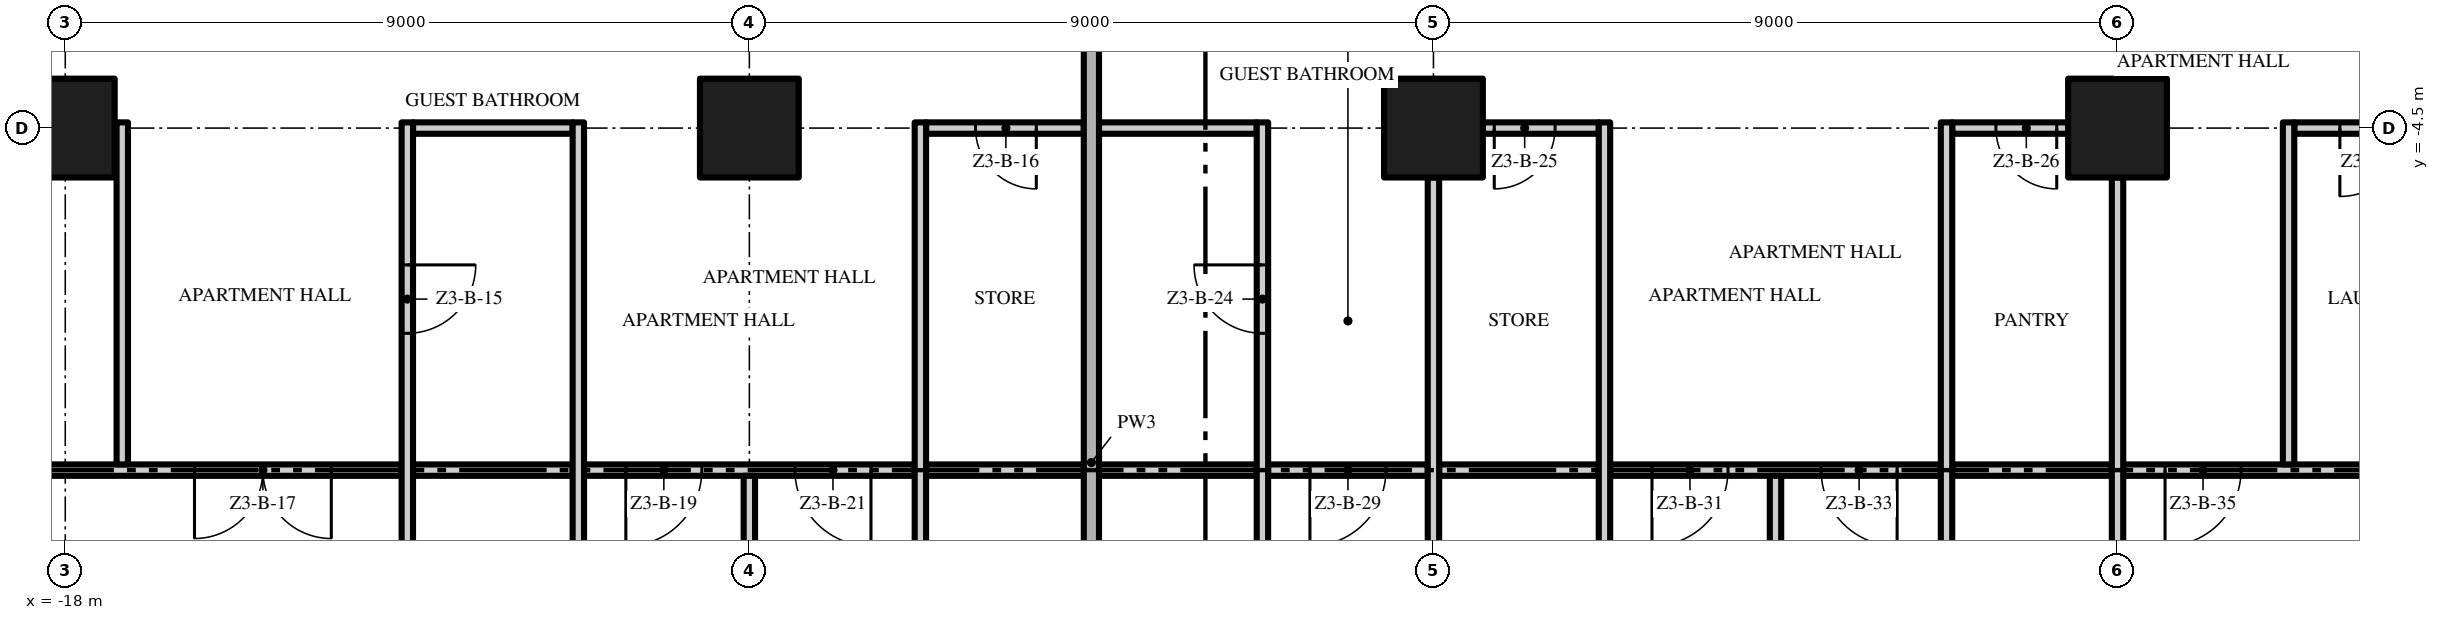
"""IFC4 building model, lengths in metres.
Left out: names, types, materials, properties, quantities, classifications, styles, units other than length and angle.
Written with IfcOpenShell. Run it as: python <this file> out.ifc"""

import sys

from ifc_helpers import new_model, si_unit, direction, frame, frame_2d, origin, origin_2d, place, context, subcontext, project, spatial, rectangle, extrude, element, fill, save


model = new_model("IFC4")
c1 = context("Model", 3, precision=1e-05, world=origin(), true_north=direction((0.0, 1.0)))
c2 = subcontext(c1, "Body", "Model", "MODEL_VIEW")
j1 = project(units=[si_unit("LENGTHUNIT", "METRE"), si_unit("PLANEANGLEUNIT", "RADIAN")], contexts=[c1])
p1 = place(None, origin())
s1 = spatial("IfcSite", under=j1, at=p1, CompositionType="ELEMENT")
p2 = place(p1, origin())
s2 = spatial("IfcBuilding", under=s1, at=p2, CompositionType="ELEMENT")
p3 = place(p2, frame((0.0, 0.0, 136.4)))
s3 = spatial("IfcBuildingStorey", under=s2, at=p3, CompositionType="ELEMENT", Elevation=136.4)
for number, where, z_axis, x_axis in (
    (1, (-18.0, -4.5, 0.0), (0.0, 0.0, 1.0), (1.0, 0.0, 0.0)),
    (2, (-9.0, -4.5, 0.0), (0.0, 0.0, 1.0), (1.0, 0.0, 0.0)),
    (3, (0.0, -4.5, 0.0), (0.0, 0.0, 1.0), (1.0, 0.0, 0.0)),
    (4, (9.0, -4.5, 0.0), (0.0, 0.0, 1.0), (1.0, 0.0, 0.0)),
):
    element("IfcColumn", number, at=place(p3, frame(where, z_axis=z_axis, x_axis=x_axis)), inside=s3, PredefinedType="COLUMN", context=c2, shape_type="SweptSolid", body=[
        extrude(rectangle(XDim=1.3, YDim=1.3, at=origin_2d()), origin(), (0.0, 0.0, 1.0), 3.5),
    ])
p4 = place(p3, frame((-13.575, -9.0, 0.0), z_axis=(0.0, 0.0, 1.0), x_axis=(-1.0, 0.0, 0.0)))
e5 = element("IfcWall", 5, at=p4, inside=s3, PredefinedType="PARTITIONING", context=c2, shape_type="SweptSolid", body=[
    extrude(rectangle(XDim=8.625, YDim=0.15, at=frame_2d((4.312, 0.0))), origin(), (0.0, 0.0, 1.0), 3.5),
])
p5 = place(p4, frame((0.925, 0.0, 0.0)))
e6 = element("IfcOpeningElement", 6, at=p5, cuts=e5, PredefinedType="OPENING", context=c2, shape_type="SweptSolid", body=[
    extrude(rectangle(XDim=1.8, YDim=2.4, at=frame_2d((0.9, 1.2))), frame((0.0, 0.085, 0.0), z_axis=(0.0, -1.0, 0.0), x_axis=(1.0, 0.0, 0.0)), (0.0, 0.0, 1.0), 0.17),
])
p6 = place(p3, frame((-13.425, -9.0, 0.0), z_axis=(0.0, 0.0, 1.0), x_axis=(1.0, 0.0, 0.0)))
e7 = element("IfcWall", 7, at=p6, inside=s3, PredefinedType="PARTITIONING", context=c2, shape_type="SweptSolid", body=[
    extrude(rectangle(XDim=2.1, YDim=0.15, at=frame_2d((1.05, 0.0))), origin(), (0.0, 0.0, 1.0), 3.5),
])
p7 = place(p3, frame((-6.825, -9.0, 0.0), z_axis=(0.0, 0.0, 1.0), x_axis=(-1.0, 0.0, 0.0)))
e8 = element("IfcWall", 8, at=p7, inside=s3, PredefinedType="PARTITIONING", context=c2, shape_type="SweptSolid", body=[
    extrude(rectangle(XDim=4.35, YDim=0.15, at=frame_2d((2.175, 0.0))), origin(), (0.0, 0.0, 1.0), 3.5),
])
p8 = place(p7, frame((2.8, 0.0, 0.0)))
e9 = element("IfcOpeningElement", 9, at=p8, cuts=e8, PredefinedType="OPENING", context=c2, shape_type="SweptSolid", body=[
    extrude(rectangle(XDim=1.0, YDim=2.4, at=frame_2d((0.5, 1.2))), frame((0.0, 0.085, 0.0), z_axis=(0.0, -1.0, 0.0), x_axis=(1.0, 0.0, 0.0)), (0.0, 0.0, 1.0), 0.17),
])
p9 = place(p7, frame((0.575, 0.0, 0.0)))
e10 = element("IfcOpeningElement", 10, at=p9, cuts=e8, PredefinedType="OPENING", context=c2, shape_type="SweptSolid", body=[
    extrude(rectangle(XDim=1.0, YDim=2.4, at=frame_2d((0.5, 1.2))), frame((0.0, 0.085, 0.0), z_axis=(0.0, -1.0, 0.0), x_axis=(1.0, 0.0, 0.0)), (0.0, 0.0, 1.0), 0.17),
])
for number, where, z_axis, x_axis in (
    (11, (-6.675, -9.0, 0.0), (0.0, 0.0, 1.0), (1.0, 0.0, 0.0)),
    (12, (-4.4, -9.0, 0.0), (0.0, 0.0, 1.0), (1.0, 0.0, 0.0)),
):
    element("IfcWall", number, at=place(p3, frame(where, z_axis=z_axis, x_axis=x_axis)), inside=s3, PredefinedType="PARTITIONING", context=c2, shape_type="SweptSolid", body=[
        extrude(rectangle(XDim=2.075, YDim=0.15, at=frame_2d((1.038, 0.0))), origin(), (0.0, 0.0, 1.0), 3.5),
    ])
p10 = place(p3, frame((-0.075, -9.0, 0.0), z_axis=(0.0, 0.0, 1.0), x_axis=(-1.0, 0.0, 0.0)))
e13 = element("IfcWall", 13, at=p10, inside=s3, PredefinedType="PARTITIONING", context=c2, shape_type="SweptSolid", body=[
    extrude(rectangle(XDim=2.1, YDim=0.15, at=frame_2d((1.05, 0.0))), origin(), (0.0, 0.0, 1.0), 3.5),
])
p11 = place(p10, frame((0.55, 0.0, 0.0)))
e14 = element("IfcOpeningElement", 14, at=p11, cuts=e13, PredefinedType="OPENING", context=c2, shape_type="SweptSolid", body=[
    extrude(rectangle(XDim=1.0, YDim=2.4, at=frame_2d((0.5, 1.2))), frame((0.0, 0.085, 0.0), z_axis=(0.0, -1.0, 0.0), x_axis=(1.0, 0.0, 0.0)), (0.0, 0.0, 1.0), 0.17),
])
p12 = place(p3, frame((0.075, -9.0, 0.0), z_axis=(0.0, 0.0, 1.0), x_axis=(1.0, 0.0, 0.0)))
e15 = element("IfcWall", 15, at=p12, inside=s3, PredefinedType="PARTITIONING", context=c2, shape_type="SweptSolid", body=[
    extrude(rectangle(XDim=2.1, YDim=0.15, at=frame_2d((1.05, 0.0))), origin(), (0.0, 0.0, 1.0), 3.5),
])
p13 = place(p3, frame((6.675, -9.0, 0.0), z_axis=(0.0, 0.0, 1.0), x_axis=(-1.0, 0.0, 0.0)))
e16 = element("IfcWall", 16, at=p13, inside=s3, PredefinedType="PARTITIONING", context=c2, shape_type="SweptSolid", body=[
    extrude(rectangle(XDim=4.35, YDim=0.15, at=frame_2d((2.175, 0.0))), origin(), (0.0, 0.0, 1.0), 3.5),
])
p14 = place(p13, frame((2.8, 0.0, 0.0)))
e17 = element("IfcOpeningElement", 17, at=p14, cuts=e16, PredefinedType="OPENING", context=c2, shape_type="SweptSolid", body=[
    extrude(rectangle(XDim=1.0, YDim=2.4, at=frame_2d((0.5, 1.2))), frame((0.0, 0.085, 0.0), z_axis=(0.0, -1.0, 0.0), x_axis=(1.0, 0.0, 0.0)), (0.0, 0.0, 1.0), 0.17),
])
p15 = place(p13, frame((0.575, 0.0, 0.0)))
e18 = element("IfcOpeningElement", 18, at=p15, cuts=e16, PredefinedType="OPENING", context=c2, shape_type="SweptSolid", body=[
    extrude(rectangle(XDim=1.0, YDim=2.4, at=frame_2d((0.5, 1.2))), frame((0.0, 0.085, 0.0), z_axis=(0.0, -1.0, 0.0), x_axis=(1.0, 0.0, 0.0)), (0.0, 0.0, 1.0), 0.17),
])
p16 = place(p3, frame((6.825, -9.0, 0.0), z_axis=(0.0, 0.0, 1.0), x_axis=(1.0, 0.0, 0.0)))
e19 = element("IfcWall", 19, at=p16, inside=s3, PredefinedType="PARTITIONING", context=c2, shape_type="SweptSolid", body=[
    extrude(rectangle(XDim=2.1, YDim=0.15, at=frame_2d((1.05, 0.0))), origin(), (0.0, 0.0, 1.0), 3.5),
])
p17 = place(p3, frame((13.425, -9.0, 0.0), z_axis=(0.0, 0.0, 1.0), x_axis=(-1.0, 0.0, 0.0)))
e20 = element("IfcWall", 20, at=p17, inside=s3, PredefinedType="PARTITIONING", context=c2, shape_type="SweptSolid", body=[
    extrude(rectangle(XDim=4.35, YDim=0.15, at=frame_2d((2.175, 0.0))), origin(), (0.0, 0.0, 1.0), 3.5),
])
p18 = place(p17, frame((2.8, 0.0, 0.0)))
e21 = element("IfcOpeningElement", 21, at=p18, cuts=e20, PredefinedType="OPENING", context=c2, shape_type="SweptSolid", body=[
    extrude(rectangle(XDim=1.0, YDim=2.4, at=frame_2d((0.5, 1.2))), frame((0.0, 0.085, 0.0), z_axis=(0.0, -1.0, 0.0), x_axis=(1.0, 0.0, 0.0)), (0.0, 0.0, 1.0), 0.17),
])
p19 = place(p3, frame((-13.425, -4.5, 0.0), z_axis=(0.0, 0.0, 1.0), x_axis=(1.0, 0.0, 0.0)))
e22 = element("IfcWall", 22, at=p19, inside=s3, PredefinedType="PARTITIONING", context=c2, shape_type="SweptSolid", body=[
    extrude(rectangle(XDim=2.1, YDim=0.15, at=frame_2d((1.05, 0.0))), origin(), (0.0, 0.0, 1.0), 3.5),
])
p20 = place(p3, frame((-4.6, -4.5, 0.0), z_axis=(0.0, 0.0, 1.0), x_axis=(-1.0, 0.0, 0.0)))
e23 = element("IfcWall", 23, at=p20, inside=s3, PredefinedType="PARTITIONING", context=c2, shape_type="SweptSolid", body=[
    extrude(rectangle(XDim=2.075, YDim=0.15, at=frame_2d((1.038, 0.0))), origin(), (0.0, 0.0, 1.0), 3.5),
])
p21 = place(p20, frame((0.625, 0.0, 0.0)))
e24 = element("IfcOpeningElement", 24, at=p21, cuts=e23, PredefinedType="OPENING", context=c2, shape_type="SweptSolid", body=[
    extrude(rectangle(XDim=0.8, YDim=2.0, at=frame_2d((0.4, 1.0))), frame((0.0, 0.085, 0.0), z_axis=(0.0, -1.0, 0.0), x_axis=(1.0, 0.0, 0.0)), (0.0, 0.0, 1.0), 0.17),
])
p22 = place(p3, frame((-4.4, -4.5, 0.0), z_axis=(0.0, 0.0, 1.0), x_axis=(1.0, 0.0, 0.0)))
e25 = element("IfcWall", 25, at=p22, inside=s3, PredefinedType="PARTITIONING", context=c2, shape_type="SweptSolid", body=[
    extrude(rectangle(XDim=2.075, YDim=0.15, at=frame_2d((1.038, 0.0))), origin(), (0.0, 0.0, 1.0), 3.5),
])
p23 = place(p3, frame((2.175, -4.5, 0.0), z_axis=(0.0, 0.0, 1.0), x_axis=(-1.0, 0.0, 0.0)))
e26 = element("IfcWall", 26, at=p23, inside=s3, PredefinedType="PARTITIONING", context=c2, shape_type="SweptSolid", body=[
    extrude(rectangle(XDim=1.525, YDim=0.15, at=frame_2d((0.762, 0.0))), origin(), (0.0, 0.0, 1.0), 3.5),
])
p24 = place(p23, frame((0.575, 0.0, 0.0)))
e27 = element("IfcOpeningElement", 27, at=p24, cuts=e26, PredefinedType="OPENING", context=c2, shape_type="SweptSolid", body=[
    extrude(rectangle(XDim=0.8, YDim=2.0, at=frame_2d((0.4, 1.0))), frame((0.0, 0.085, 0.0), z_axis=(0.0, -1.0, 0.0), x_axis=(1.0, 0.0, 0.0)), (0.0, 0.0, 1.0), 0.17),
])
p25 = place(p3, frame((8.35, -4.5, 0.0), z_axis=(0.0, 0.0, 1.0), x_axis=(-1.0, 0.0, 0.0)))
e28 = element("IfcWall", 28, at=p25, inside=s3, PredefinedType="PARTITIONING", context=c2, shape_type="SweptSolid", body=[
    extrude(rectangle(XDim=1.525, YDim=0.15, at=frame_2d((0.762, 0.0))), origin(), (0.0, 0.0, 1.0), 3.5),
])
p26 = place(p25, frame((0.15, 0.0, 0.0)))
e29 = element("IfcOpeningElement", 29, at=p26, cuts=e28, PredefinedType="OPENING", context=c2, shape_type="SweptSolid", body=[
    extrude(rectangle(XDim=0.8, YDim=2.0, at=frame_2d((0.4, 1.0))), frame((0.0, 0.085, 0.0), z_axis=(0.0, -1.0, 0.0), x_axis=(1.0, 0.0, 0.0)), (0.0, 0.0, 1.0), 0.17),
])
p27 = place(p3, frame((13.425, -4.5, 0.0), z_axis=(0.0, 0.0, 1.0), x_axis=(-1.0, 0.0, 0.0)))
e30 = element("IfcWall", 30, at=p27, inside=s3, PredefinedType="PARTITIONING", context=c2, shape_type="SweptSolid", body=[
    extrude(rectangle(XDim=2.1, YDim=0.15, at=frame_2d((1.05, 0.0))), origin(), (0.0, 0.0, 1.0), 3.5),
])
p28 = place(p27, frame((0.6, 0.0, 0.0)))
e31 = element("IfcOpeningElement", 31, at=p28, cuts=e30, PredefinedType="OPENING", context=c2, shape_type="SweptSolid", body=[
    extrude(rectangle(XDim=0.9, YDim=2.1, at=frame_2d((0.45, 1.05))), frame((0.0, 0.085, 0.0), z_axis=(0.0, -1.0, 0.0), x_axis=(1.0, 0.0, 0.0)), (0.0, 0.0, 1.0), 0.17),
])
p29 = place(p3, frame((-17.25, -8.925, 0.0), z_axis=(0.0, 0.0, 1.0), x_axis=(0.0, 1.0, 0.0)))
e32 = element("IfcWall", 32, at=p29, inside=s3, PredefinedType="PARTITIONING", context=c2, shape_type="SweptSolid", body=[
    extrude(rectangle(XDim=4.5, YDim=0.15, at=frame_2d((2.25, 0.0))), origin(), (0.0, 0.0, 1.0), 3.5),
])
p30 = place(p3, frame((-13.5, -4.425, 0.0), z_axis=(0.0, 0.0, 1.0), x_axis=(0.0, -1.0, 0.0)))
e33 = element("IfcWall", 33, at=p30, inside=s3, PredefinedType="PARTITIONING", context=c2, shape_type="SweptSolid", body=[
    extrude(rectangle(XDim=13.275, YDim=0.15, at=frame_2d((6.638, 0.0))), origin(), (0.0, 0.0, 1.0), 3.5),
])
p31 = place(p30, frame((1.875, 0.0, 0.0)))
e34 = element("IfcOpeningElement", 34, at=p31, cuts=e33, PredefinedType="OPENING", context=c2, shape_type="SweptSolid", body=[
    extrude(rectangle(XDim=0.9, YDim=2.1, at=frame_2d((0.45, 1.05))), frame((0.0, 0.085, 0.0), z_axis=(0.0, -1.0, 0.0), x_axis=(1.0, 0.0, 0.0)), (0.0, 0.0, 1.0), 0.17),
])
p32 = place(p3, frame((-11.25, -12.075, 0.0), z_axis=(0.0, 0.0, 1.0), x_axis=(0.0, 1.0, 0.0)))
e35 = element("IfcWall", 35, at=p32, inside=s3, PredefinedType="PARTITIONING", context=c2, shape_type="SweptSolid", body=[
    extrude(rectangle(XDim=7.65, YDim=0.15, at=frame_2d((3.825, 0.0))), origin(), (0.0, 0.0, 1.0), 3.5),
])
p33 = place(p3, frame((-9.0, -12.85, 0.0), z_axis=(0.0, 0.0, 1.0), x_axis=(0.0, 1.0, 0.0)))
e36 = element("IfcWall", 36, at=p33, inside=s3, PredefinedType="PARTITIONING", context=c2, shape_type="SweptSolid", body=[
    extrude(rectangle(XDim=3.775, YDim=0.15, at=frame_2d((1.887, 0.0))), origin(), (0.0, 0.0, 1.0), 3.5),
])
p34 = place(p3, frame((-6.75, -12.075, 0.0), z_axis=(0.0, 0.0, 1.0), x_axis=(0.0, 1.0, 0.0)))
e37 = element("IfcWall", 37, at=p34, inside=s3, PredefinedType="PARTITIONING", context=c2, shape_type="SweptSolid", body=[
    extrude(rectangle(XDim=7.65, YDim=0.15, at=frame_2d((3.825, 0.0))), origin(), (0.0, 0.0, 1.0), 3.5),
])
p35 = place(p3, frame((-4.5, -17.7, 0.0), z_axis=(0.0, 0.0, 1.0), x_axis=(0.0, 1.0, 0.0)))
e38 = element("IfcWall", 38, at=p35, inside=s3, PredefinedType="PARTITIONING", context=c2, shape_type="SweptSolid", body=[
    extrude(rectangle(XDim=17.6, YDim=0.2, at=frame_2d((8.8, 0.0))), origin(), (0.0, 0.0, 1.0), 3.5),
])
p36 = place(p3, frame((-2.25, -12.075, 0.0), z_axis=(0.0, 0.0, 1.0), x_axis=(0.0, 1.0, 0.0)))
e39 = element("IfcWall", 39, at=p36, inside=s3, PredefinedType="PARTITIONING", context=c2, shape_type="SweptSolid", body=[
    extrude(rectangle(XDim=7.65, YDim=0.15, at=frame_2d((3.825, 0.0))), origin(), (0.0, 0.0, 1.0), 3.5),
])
p37 = place(p36, frame((4.875, 0.0, 0.0)))
e40 = element("IfcOpeningElement", 40, at=p37, cuts=e39, PredefinedType="OPENING", context=c2, shape_type="SweptSolid", body=[
    extrude(rectangle(XDim=0.9, YDim=2.1, at=frame_2d((0.45, 1.05))), frame((0.0, 0.085, 0.0), z_axis=(0.0, -1.0, 0.0), x_axis=(1.0, 0.0, 0.0)), (0.0, 0.0, 1.0), 0.17),
])
p38 = place(p36, frame((1.125, 0.0, 0.0)))
e41 = element("IfcOpeningElement", 41, at=p38, cuts=e39, PredefinedType="OPENING", context=c2, shape_type="SweptSolid", body=[
    extrude(rectangle(XDim=0.9, YDim=2.1, at=frame_2d((0.45, 1.05))), frame((0.0, 0.085, 0.0), z_axis=(0.0, -1.0, 0.0), x_axis=(1.0, 0.0, 0.0)), (0.0, 0.0, 1.0), 0.17),
])
p39 = place(p3, frame((0.0, -12.85, 0.0), z_axis=(0.0, 0.0, 1.0), x_axis=(0.0, 1.0, 0.0)))
e42 = element("IfcWall", 42, at=p39, inside=s3, PredefinedType="PARTITIONING", context=c2, shape_type="SweptSolid", body=[
    extrude(rectangle(XDim=7.7, YDim=0.15, at=frame_2d((3.85, 0.0))), origin(), (0.0, 0.0, 1.0), 3.5),
])
p40 = place(p3, frame((2.25, -12.075, 0.0), z_axis=(0.0, 0.0, 1.0), x_axis=(0.0, 1.0, 0.0)))
e43 = element("IfcWall", 43, at=p40, inside=s3, PredefinedType="PARTITIONING", context=c2, shape_type="SweptSolid", body=[
    extrude(rectangle(XDim=7.65, YDim=0.15, at=frame_2d((3.825, 0.0))), origin(), (0.0, 0.0, 1.0), 3.5),
])
p41 = place(p3, frame((4.5, -17.7, 0.0), z_axis=(0.0, 0.0, 1.0), x_axis=(0.0, 1.0, 0.0)))
e44 = element("IfcWall", 44, at=p41, inside=s3, PredefinedType="PARTITIONING", context=c2, shape_type="SweptSolid", body=[
    extrude(rectangle(XDim=8.625, YDim=0.15, at=frame_2d((4.312, 0.0))), origin(), (0.0, 0.0, 1.0), 3.5),
])
p42 = place(p3, frame((6.75, -12.075, 0.0), z_axis=(0.0, 0.0, 1.0), x_axis=(0.0, 1.0, 0.0)))
e45 = element("IfcWall", 45, at=p42, inside=s3, PredefinedType="PARTITIONING", context=c2, shape_type="SweptSolid", body=[
    extrude(rectangle(XDim=7.65, YDim=0.15, at=frame_2d((3.825, 0.0))), origin(), (0.0, 0.0, 1.0), 3.5),
])
p43 = place(p3, frame((9.0, -12.85, 0.0), z_axis=(0.0, 0.0, 1.0), x_axis=(0.0, 1.0, 0.0)))
e46 = element("IfcWall", 46, at=p43, inside=s3, PredefinedType="PARTITIONING", context=c2, shape_type="SweptSolid", body=[
    extrude(rectangle(XDim=7.7, YDim=0.15, at=frame_2d((3.85, 0.0))), origin(), (0.0, 0.0, 1.0), 3.5),
])
p44 = place(p3, frame((11.25, -8.925, 0.0), z_axis=(0.0, 0.0, 1.0), x_axis=(0.0, 1.0, 0.0)))
e47 = element("IfcWall", 47, at=p44, inside=s3, PredefinedType="PARTITIONING", context=c2, shape_type="SweptSolid", body=[
    extrude(rectangle(XDim=4.5, YDim=0.15, at=frame_2d((2.25, 0.0))), origin(), (0.0, 0.0, 1.0), 3.5),
])
p45 = place(p31, origin())
e48 = element("IfcDoor", 48, at=p45, inside=s3, OperationType="SINGLE_SWING_LEFT", PredefinedType="DOOR", context=c2, shape_type="SweptSolid", body=[
    extrude(rectangle(XDim=0.9, YDim=2.1, at=frame_2d((0.45, 1.05))), frame((0.0, 0.025, 0.0), z_axis=(0.0, -1.0, 0.0), x_axis=(1.0, 0.0, 0.0)), (0.0, 0.0, 1.0), 0.05),
])
fill(e34, e48)
p46 = place(p21, origin())
e49 = element("IfcDoor", 49, at=p46, inside=s3, OperationType="SINGLE_SWING_LEFT", PredefinedType="DOOR", context=c2, shape_type="SweptSolid", body=[
    extrude(rectangle(XDim=0.8, YDim=2.0, at=frame_2d((0.4, 1.0))), frame((0.0, 0.025, 0.0), z_axis=(0.0, -1.0, 0.0), x_axis=(1.0, 0.0, 0.0)), (0.0, 0.0, 1.0), 0.05),
])
fill(e24, e49)
p47 = place(p5, origin())
e50 = element("IfcDoor", 50, at=p47, inside=s3, OperationType="DOUBLE_DOOR_SINGLE_SWING", PredefinedType="DOOR", context=c2, shape_type="SweptSolid", body=[
    extrude(rectangle(XDim=1.8, YDim=2.4, at=frame_2d((0.9, 1.2))), frame((0.0, 0.025, 0.0), z_axis=(0.0, -1.0, 0.0), x_axis=(1.0, 0.0, 0.0)), (0.0, 0.0, 1.0), 0.05),
])
fill(e6, e50)
p48 = place(p8, origin())
e51 = element("IfcDoor", 51, at=p48, inside=s3, OperationType="SINGLE_SWING_RIGHT", PredefinedType="DOOR", context=c2, shape_type="SweptSolid", body=[
    extrude(rectangle(XDim=1.0, YDim=2.4, at=frame_2d((0.5, 1.2))), frame((0.0, 0.025, 0.0), z_axis=(0.0, -1.0, 0.0), x_axis=(1.0, 0.0, 0.0)), (0.0, 0.0, 1.0), 0.05),
])
fill(e9, e51)
p49 = place(p9, origin())
e52 = element("IfcDoor", 52, at=p49, inside=s3, OperationType="SINGLE_SWING_LEFT", PredefinedType="DOOR", context=c2, shape_type="SweptSolid", body=[
    extrude(rectangle(XDim=1.0, YDim=2.4, at=frame_2d((0.5, 1.2))), frame((0.0, 0.025, 0.0), z_axis=(0.0, -1.0, 0.0), x_axis=(1.0, 0.0, 0.0)), (0.0, 0.0, 1.0), 0.05),
])
fill(e10, e52)
p50 = place(p37, origin())
e53 = element("IfcDoor", 53, at=p50, inside=s3, OperationType="SINGLE_SWING_RIGHT", PredefinedType="DOOR", context=c2, shape_type="SweptSolid", body=[
    extrude(rectangle(XDim=0.9, YDim=2.1, at=frame_2d((0.45, 1.05))), frame((0.0, 0.025, 0.0), z_axis=(0.0, -1.0, 0.0), x_axis=(1.0, 0.0, 0.0)), (0.0, 0.0, 1.0), 0.05),
])
fill(e40, e53)
p51 = place(p24, origin())
e54 = element("IfcDoor", 54, at=p51, inside=s3, OperationType="SINGLE_SWING_RIGHT", PredefinedType="DOOR", context=c2, shape_type="SweptSolid", body=[
    extrude(rectangle(XDim=0.8, YDim=2.0, at=frame_2d((0.4, 1.0))), frame((0.0, 0.025, 0.0), z_axis=(0.0, -1.0, 0.0), x_axis=(1.0, 0.0, 0.0)), (0.0, 0.0, 1.0), 0.05),
])
fill(e27, e54)
p52 = place(p26, origin())
e55 = element("IfcDoor", 55, at=p52, inside=s3, OperationType="SINGLE_SWING_LEFT", PredefinedType="DOOR", context=c2, shape_type="SweptSolid", body=[
    extrude(rectangle(XDim=0.8, YDim=2.0, at=frame_2d((0.4, 1.0))), frame((0.0, 0.025, 0.0), z_axis=(0.0, -1.0, 0.0), x_axis=(1.0, 0.0, 0.0)), (0.0, 0.0, 1.0), 0.05),
])
fill(e29, e55)
p53 = place(p28, origin())
e56 = element("IfcDoor", 56, at=p53, inside=s3, OperationType="SINGLE_SWING_RIGHT", PredefinedType="DOOR", context=c2, shape_type="SweptSolid", body=[
    extrude(rectangle(XDim=0.9, YDim=2.1, at=frame_2d((0.45, 1.05))), frame((0.0, 0.025, 0.0), z_axis=(0.0, -1.0, 0.0), x_axis=(1.0, 0.0, 0.0)), (0.0, 0.0, 1.0), 0.05),
])
fill(e31, e56)
p54 = place(p11, origin())
e57 = element("IfcDoor", 57, at=p54, inside=s3, OperationType="SINGLE_SWING_RIGHT", PredefinedType="DOOR", context=c2, shape_type="SweptSolid", body=[
    extrude(rectangle(XDim=1.0, YDim=2.4, at=frame_2d((0.5, 1.2))), frame((0.0, 0.025, 0.0), z_axis=(0.0, -1.0, 0.0), x_axis=(1.0, 0.0, 0.0)), (0.0, 0.0, 1.0), 0.05),
])
fill(e14, e57)
p55 = place(p14, origin())
e58 = element("IfcDoor", 58, at=p55, inside=s3, OperationType="SINGLE_SWING_RIGHT", PredefinedType="DOOR", context=c2, shape_type="SweptSolid", body=[
    extrude(rectangle(XDim=1.0, YDim=2.4, at=frame_2d((0.5, 1.2))), frame((0.0, 0.025, 0.0), z_axis=(0.0, -1.0, 0.0), x_axis=(1.0, 0.0, 0.0)), (0.0, 0.0, 1.0), 0.05),
])
fill(e17, e58)
p56 = place(p15, origin())
e59 = element("IfcDoor", 59, at=p56, inside=s3, OperationType="SINGLE_SWING_LEFT", PredefinedType="DOOR", context=c2, shape_type="SweptSolid", body=[
    extrude(rectangle(XDim=1.0, YDim=2.4, at=frame_2d((0.5, 1.2))), frame((0.0, 0.025, 0.0), z_axis=(0.0, -1.0, 0.0), x_axis=(1.0, 0.0, 0.0)), (0.0, 0.0, 1.0), 0.05),
])
fill(e18, e59)
p57 = place(p18, origin())
e60 = element("IfcDoor", 60, at=p57, inside=s3, OperationType="SINGLE_SWING_RIGHT", PredefinedType="DOOR", context=c2, shape_type="SweptSolid", body=[
    extrude(rectangle(XDim=1.0, YDim=2.4, at=frame_2d((0.5, 1.2))), frame((0.0, 0.025, 0.0), z_axis=(0.0, -1.0, 0.0), x_axis=(1.0, 0.0, 0.0)), (0.0, 0.0, 1.0), 0.05),
])
fill(e21, e60)
save(model, sys.argv[1])
